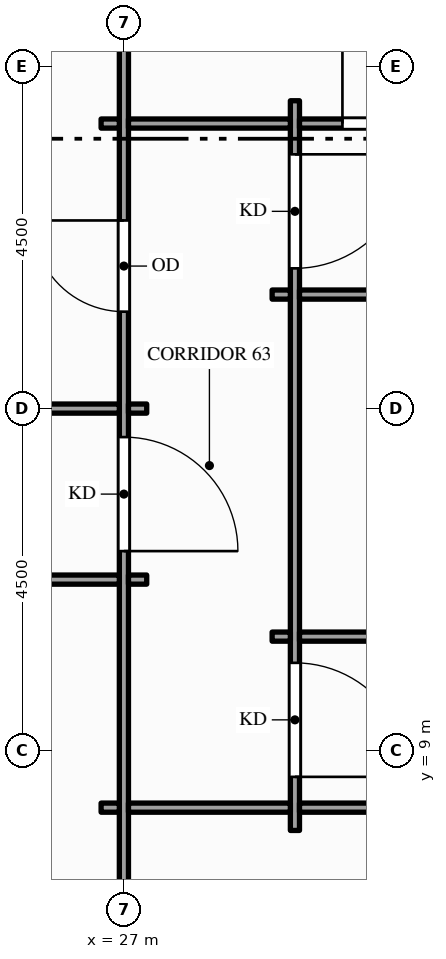
"""IFC4 building model, lengths in metres.
Left out: names, types, materials, properties, quantities, classifications, styles, units other than length and angle.
Written with IfcOpenShell. Run it as: python <this file> out.ifc"""

import sys

from ifc_helpers import new_model, si_unit, direction, frame, frame_2d, origin, place, context, subcontext, project, spatial, rectangle, extrude, element, fill, save


model = new_model("IFC4")
c1 = context("Model", 3, precision=1e-05, world=origin(), true_north=direction((0.0, 1.0)))
c2 = subcontext(c1, "Body", "Model", "MODEL_VIEW")
j1 = project(units=[si_unit("LENGTHUNIT", "METRE"), si_unit("PLANEANGLEUNIT", "RADIAN")], contexts=[c1])
p1 = place(None, origin())
s1 = spatial("IfcSite", under=j1, at=p1, CompositionType="ELEMENT")
p2 = place(p1, origin())
s2 = spatial("IfcBuilding", under=s1, at=p2, CompositionType="ELEMENT")
p3 = place(p2, frame((0.0, 0.0, 171.0)))
s3 = spatial("IfcBuildingStorey", under=s2, at=p3, CompositionType="ELEMENT", Elevation=171.0)
p4 = place(p3, frame((27.0, 1.65, 0.0), z_axis=(0.0, 0.0, 1.0), x_axis=(0.0, 1.0, 0.0)))
e1 = element("IfcWall", 1, at=p4, inside=s3, PredefinedType="PARTITIONING", context=c2, shape_type="SweptSolid", body=[
    extrude(rectangle(XDim=22.2, YDim=0.12, at=frame_2d((11.1, 0.0))), origin(), (0.0, 0.0, 1.0), 2.87),
])
p5 = place(p4, frame((9.975, 0.0, 0.0)))
e2 = element("IfcOpeningElement", 2, at=p5, cuts=e1, PredefinedType="OPENING", context=c2, shape_type="SweptSolid", body=[
    extrude(rectangle(XDim=1.5, YDim=2.1, at=frame_2d((0.75, 1.05))), frame((0.0, 0.07, 0.0), z_axis=(0.0, -1.0, 0.0), x_axis=(1.0, 0.0, 0.0)), (0.0, 0.0, 1.0), 0.14),
])
p6 = place(p4, frame((13.125, 0.0, 0.0)))
e3 = element("IfcOpeningElement", 3, at=p6, cuts=e1, PredefinedType="OPENING", context=c2, shape_type="SweptSolid", body=[
    extrude(rectangle(XDim=1.2, YDim=2.1, at=frame_2d((0.6, 1.05))), frame((0.0, 0.07, 0.0), z_axis=(0.0, -1.0, 0.0), x_axis=(1.0, 0.0, 0.0)), (0.0, 0.0, 1.0), 0.14),
])
p7 = place(p3, frame((29.25, 7.95, 0.0), z_axis=(0.0, 0.0, 1.0), x_axis=(0.0, 1.0, 0.0)))
e4 = element("IfcWall", 4, at=p7, inside=s3, PredefinedType="PARTITIONING", context=c2, shape_type="SweptSolid", body=[
    extrude(rectangle(XDim=9.6, YDim=0.12, at=frame_2d((4.8, 0.0))), origin(), (0.0, 0.0, 1.0), 2.87),
])
p8 = place(p7, frame((0.705, 0.0, 0.0)))
e5 = element("IfcOpeningElement", 5, at=p8, cuts=e4, PredefinedType="OPENING", context=c2, shape_type="SweptSolid", body=[
    extrude(rectangle(XDim=1.5, YDim=2.1, at=frame_2d((0.75, 1.05))), frame((0.0, 0.07, 0.0), z_axis=(0.0, -1.0, 0.0), x_axis=(1.0, 0.0, 0.0)), (0.0, 0.0, 1.0), 0.14),
])
p9 = place(p7, frame((7.395, 0.0, 0.0)))
e6 = element("IfcOpeningElement", 6, at=p9, cuts=e4, PredefinedType="OPENING", context=c2, shape_type="SweptSolid", body=[
    extrude(rectangle(XDim=1.5, YDim=2.1, at=frame_2d((0.75, 1.05))), frame((0.0, 0.07, 0.0), z_axis=(0.0, -1.0, 0.0), x_axis=(1.0, 0.0, 0.0)), (0.0, 0.0, 1.0), 0.14),
])
p10 = place(p3, frame((26.7, 8.25, 0.0), z_axis=(0.0, 0.0, 1.0), x_axis=(1.0, 0.0, 0.0)))
e7 = element("IfcWall", 7, at=p10, inside=s3, PredefinedType="PARTITIONING", context=c2, shape_type="SweptSolid", body=[
    extrude(rectangle(XDim=0.24, YDim=0.12, at=frame_2d((0.12, 0.0))), origin(), (0.0, 0.0, 1.0), 2.87),
])
p11 = place(p3, frame((27.06, 8.25, 0.0), z_axis=(0.0, 0.0, 1.0), x_axis=(1.0, 0.0, 0.0)))
e8 = element("IfcWall", 8, at=p11, inside=s3, PredefinedType="PARTITIONING", context=c2, shape_type="SweptSolid", body=[
    extrude(rectangle(XDim=2.13, YDim=0.12, at=frame_2d((1.065, 0.0))), origin(), (0.0, 0.0, 1.0), 2.87),
])
p12 = place(p3, frame((29.31, 8.25, 0.0), z_axis=(0.0, 0.0, 1.0), x_axis=(1.0, 0.0, 0.0)))
e9 = element("IfcWall", 9, at=p12, inside=s3, PredefinedType="PARTITIONING", context=c2, shape_type="SweptSolid", body=[
    extrude(rectangle(XDim=6.63, YDim=0.12, at=frame_2d((3.315, 0.0))), origin(), (0.0, 0.0, 1.0), 2.87),
])
p13 = place(p12, frame((2.415, 0.0, 0.0)))
e10 = element("IfcOpeningElement", 10, at=p13, cuts=e9, PredefinedType="OPENING", context=c2, shape_type="SweptSolid", body=[
    extrude(rectangle(XDim=1.8, YDim=2.1, at=frame_2d((0.9, 1.05))), frame((0.0, 0.07, 0.0), z_axis=(0.0, -1.0, 0.0), x_axis=(1.0, 0.0, 0.0)), (0.0, 0.0, 1.0), 0.14),
])
p14 = place(p3, frame((28.95, 10.5, 0.0), z_axis=(0.0, 0.0, 1.0), x_axis=(1.0, 0.0, 0.0)))
e11 = element("IfcWall", 11, at=p14, inside=s3, PredefinedType="PARTITIONING", context=c2, shape_type="SweptSolid", body=[
    extrude(rectangle(XDim=0.24, YDim=0.12, at=frame_2d((0.12, 0.0))), origin(), (0.0, 0.0, 1.0), 2.87),
])
p15 = place(p3, frame((29.31, 10.5, 0.0), z_axis=(0.0, 0.0, 1.0), x_axis=(1.0, 0.0, 0.0)))
e12 = element("IfcWall", 12, at=p15, inside=s3, PredefinedType="PARTITIONING", context=c2, shape_type="SweptSolid", body=[
    extrude(rectangle(XDim=6.63, YDim=0.12, at=frame_2d((3.315, 0.0))), origin(), (0.0, 0.0, 1.0), 2.87),
])
p16 = place(p15, frame((2.865, 0.0, 0.0)))
e13 = element("IfcOpeningElement", 13, at=p16, cuts=e12, PredefinedType="OPENING", context=c2, shape_type="SweptSolid", body=[
    extrude(rectangle(XDim=0.9, YDim=2.1, at=frame_2d((0.45, 1.05))), frame((0.0, 0.07, 0.0), z_axis=(0.0, -1.0, 0.0), x_axis=(1.0, 0.0, 0.0)), (0.0, 0.0, 1.0), 0.14),
])
p17 = place(p3, frame((20.31, 11.25, 0.0), z_axis=(0.0, 0.0, 1.0), x_axis=(1.0, 0.0, 0.0)))
e14 = element("IfcWall", 14, at=p17, inside=s3, PredefinedType="PARTITIONING", context=c2, shape_type="SweptSolid", body=[
    extrude(rectangle(XDim=6.63, YDim=0.12, at=frame_2d((3.315, 0.0))), origin(), (0.0, 0.0, 1.0), 2.87),
])
p18 = place(p17, frame((2.815, 0.0, 0.0)))
e15 = element("IfcOpeningElement", 15, at=p18, cuts=e14, PredefinedType="OPENING", context=c2, shape_type="SweptSolid", body=[
    extrude(rectangle(XDim=1.0, YDim=2.1, at=frame_2d((0.5, 1.05))), frame((0.0, 0.07, 0.0), z_axis=(0.0, -1.0, 0.0), x_axis=(1.0, 0.0, 0.0)), (0.0, 0.0, 1.0), 0.14),
])
p19 = place(p3, frame((27.06, 11.25, 0.0), z_axis=(0.0, 0.0, 1.0), x_axis=(1.0, 0.0, 0.0)))
e16 = element("IfcWall", 16, at=p19, inside=s3, PredefinedType="PARTITIONING", context=c2, shape_type="SweptSolid", body=[
    extrude(rectangle(XDim=0.24, YDim=0.12, at=frame_2d((0.12, 0.0))), origin(), (0.0, 0.0, 1.0), 2.87),
])
p20 = place(p3, frame((9.06, 13.5, 0.0), z_axis=(0.0, 0.0, 1.0), x_axis=(1.0, 0.0, 0.0)))
e17 = element("IfcWall", 17, at=p20, inside=s3, PredefinedType="PARTITIONING", context=c2, shape_type="SweptSolid", body=[
    extrude(rectangle(XDim=17.88, YDim=0.12, at=frame_2d((8.94, 0.0))), origin(), (0.0, 0.0, 1.0), 2.87),
])
p21 = place(p20, frame((3.54, 0.0, 0.0)))
e18 = element("IfcOpeningElement", 18, at=p21, cuts=e17, PredefinedType="OPENING", context=c2, shape_type="SweptSolid", body=[
    extrude(rectangle(XDim=1.8, YDim=2.1, at=frame_2d((0.9, 1.05))), frame((0.0, 0.07, 0.0), z_axis=(0.0, -1.0, 0.0), x_axis=(1.0, 0.0, 0.0)), (0.0, 0.0, 1.0), 0.14),
])
for number, where, z_axis, x_axis in (
    (19, (27.06, 13.5, 0.0), (0.0, 0.0, 1.0), (1.0, 0.0, 0.0)),
    (20, (28.95, 15.0, 0.0), (0.0, 0.0, 1.0), (1.0, 0.0, 0.0)),
):
    element("IfcWall", number, at=place(p3, frame(where, z_axis=z_axis, x_axis=x_axis)), inside=s3, PredefinedType="PARTITIONING", context=c2, shape_type="SweptSolid", body=[
        extrude(rectangle(XDim=0.24, YDim=0.12, at=frame_2d((0.12, 0.0))), origin(), (0.0, 0.0, 1.0), 2.87),
    ])
p22 = place(p3, frame((29.31, 15.0, 0.0), z_axis=(0.0, 0.0, 1.0), x_axis=(1.0, 0.0, 0.0)))
e21 = element("IfcWall", 21, at=p22, inside=s3, PredefinedType="PARTITIONING", context=c2, shape_type="SweptSolid", body=[
    extrude(rectangle(XDim=6.63, YDim=0.12, at=frame_2d((3.315, 0.0))), origin(), (0.0, 0.0, 1.0), 2.87),
])
p23 = place(p3, frame((26.7, 17.25, 0.0), z_axis=(0.0, 0.0, 1.0), x_axis=(1.0, 0.0, 0.0)))
e22 = element("IfcWall", 22, at=p23, inside=s3, PredefinedType="PARTITIONING", context=c2, shape_type="SweptSolid", body=[
    extrude(rectangle(XDim=0.24, YDim=0.12, at=frame_2d((0.12, 0.0))), origin(), (0.0, 0.0, 1.0), 2.87),
])
p24 = place(p3, frame((27.06, 17.25, 0.0), z_axis=(0.0, 0.0, 1.0), x_axis=(1.0, 0.0, 0.0)))
e23 = element("IfcWall", 23, at=p24, inside=s3, PredefinedType="PARTITIONING", context=c2, shape_type="SweptSolid", body=[
    extrude(rectangle(XDim=2.13, YDim=0.12, at=frame_2d((1.065, 0.0))), origin(), (0.0, 0.0, 1.0), 2.87),
])
p25 = place(p3, frame((29.31, 17.25, 0.0), z_axis=(0.0, 0.0, 1.0), x_axis=(1.0, 0.0, 0.0)))
e24 = element("IfcWall", 24, at=p25, inside=s3, PredefinedType="PARTITIONING", context=c2, shape_type="SweptSolid", body=[
    extrude(rectangle(XDim=2.13, YDim=0.12, at=frame_2d((1.065, 0.0))), origin(), (0.0, 0.0, 1.0), 2.87),
])
p26 = place(p25, frame((0.565, 0.0, 0.0)))
e25 = element("IfcOpeningElement", 25, at=p26, cuts=e24, PredefinedType="OPENING", context=c2, shape_type="SweptSolid", body=[
    extrude(rectangle(XDim=1.0, YDim=2.1, at=frame_2d((0.5, 1.05))), frame((0.0, 0.07, 0.0), z_axis=(0.0, -1.0, 0.0), x_axis=(1.0, 0.0, 0.0)), (0.0, 0.0, 1.0), 0.14),
])
p27 = place(p5, origin())
e26 = element("IfcDoor", 26, at=p27, inside=s3, OperationType="SINGLE_SWING_LEFT", PredefinedType="DOOR", context=c2, shape_type="SweptSolid", body=[
    extrude(rectangle(XDim=1.5, YDim=2.1, at=frame_2d((0.75, 1.05))), frame((0.0, 0.025, 0.0), z_axis=(0.0, -1.0, 0.0), x_axis=(1.0, 0.0, 0.0)), (0.0, 0.0, 1.0), 0.05),
])
fill(e2, e26)
p28 = place(p8, origin())
e27 = element("IfcDoor", 27, at=p28, inside=s3, OperationType="SINGLE_SWING_LEFT", PredefinedType="DOOR", context=c2, shape_type="SweptSolid", body=[
    extrude(rectangle(XDim=1.5, YDim=2.1, at=frame_2d((0.75, 1.05))), frame((0.0, 0.025, 0.0), z_axis=(0.0, -1.0, 0.0), x_axis=(1.0, 0.0, 0.0)), (0.0, 0.0, 1.0), 0.05),
])
fill(e5, e27)
p29 = place(p9, origin())
e28 = element("IfcDoor", 28, at=p29, inside=s3, OperationType="SINGLE_SWING_RIGHT", PredefinedType="DOOR", context=c2, shape_type="SweptSolid", body=[
    extrude(rectangle(XDim=1.5, YDim=2.1, at=frame_2d((0.75, 1.05))), frame((0.0, 0.025, 0.0), z_axis=(0.0, -1.0, 0.0), x_axis=(1.0, 0.0, 0.0)), (0.0, 0.0, 1.0), 0.05),
])
fill(e6, e28)
p30 = place(p26, origin())
e29 = element("IfcDoor", 29, at=p30, inside=s3, OperationType="SINGLE_SWING_LEFT", PredefinedType="DOOR", context=c2, shape_type="SweptSolid", body=[
    extrude(rectangle(XDim=1.0, YDim=2.1, at=frame_2d((0.5, 1.05))), frame((0.0, 0.025, 0.0), z_axis=(0.0, -1.0, 0.0), x_axis=(1.0, 0.0, 0.0)), (0.0, 0.0, 1.0), 0.05),
])
fill(e25, e29)
p31 = place(p6, origin())
e30 = element("IfcDoor", 30, at=p31, inside=s3, OperationType="SINGLE_SWING_RIGHT", PredefinedType="DOOR", context=c2, shape_type="SweptSolid", body=[
    extrude(rectangle(XDim=1.2, YDim=2.1, at=frame_2d((0.6, 1.05))), frame((0.0, 0.025, 0.0), z_axis=(0.0, -1.0, 0.0), x_axis=(1.0, 0.0, 0.0)), (0.0, 0.0, 1.0), 0.05),
])
fill(e3, e30)
save(model, sys.argv[1])
